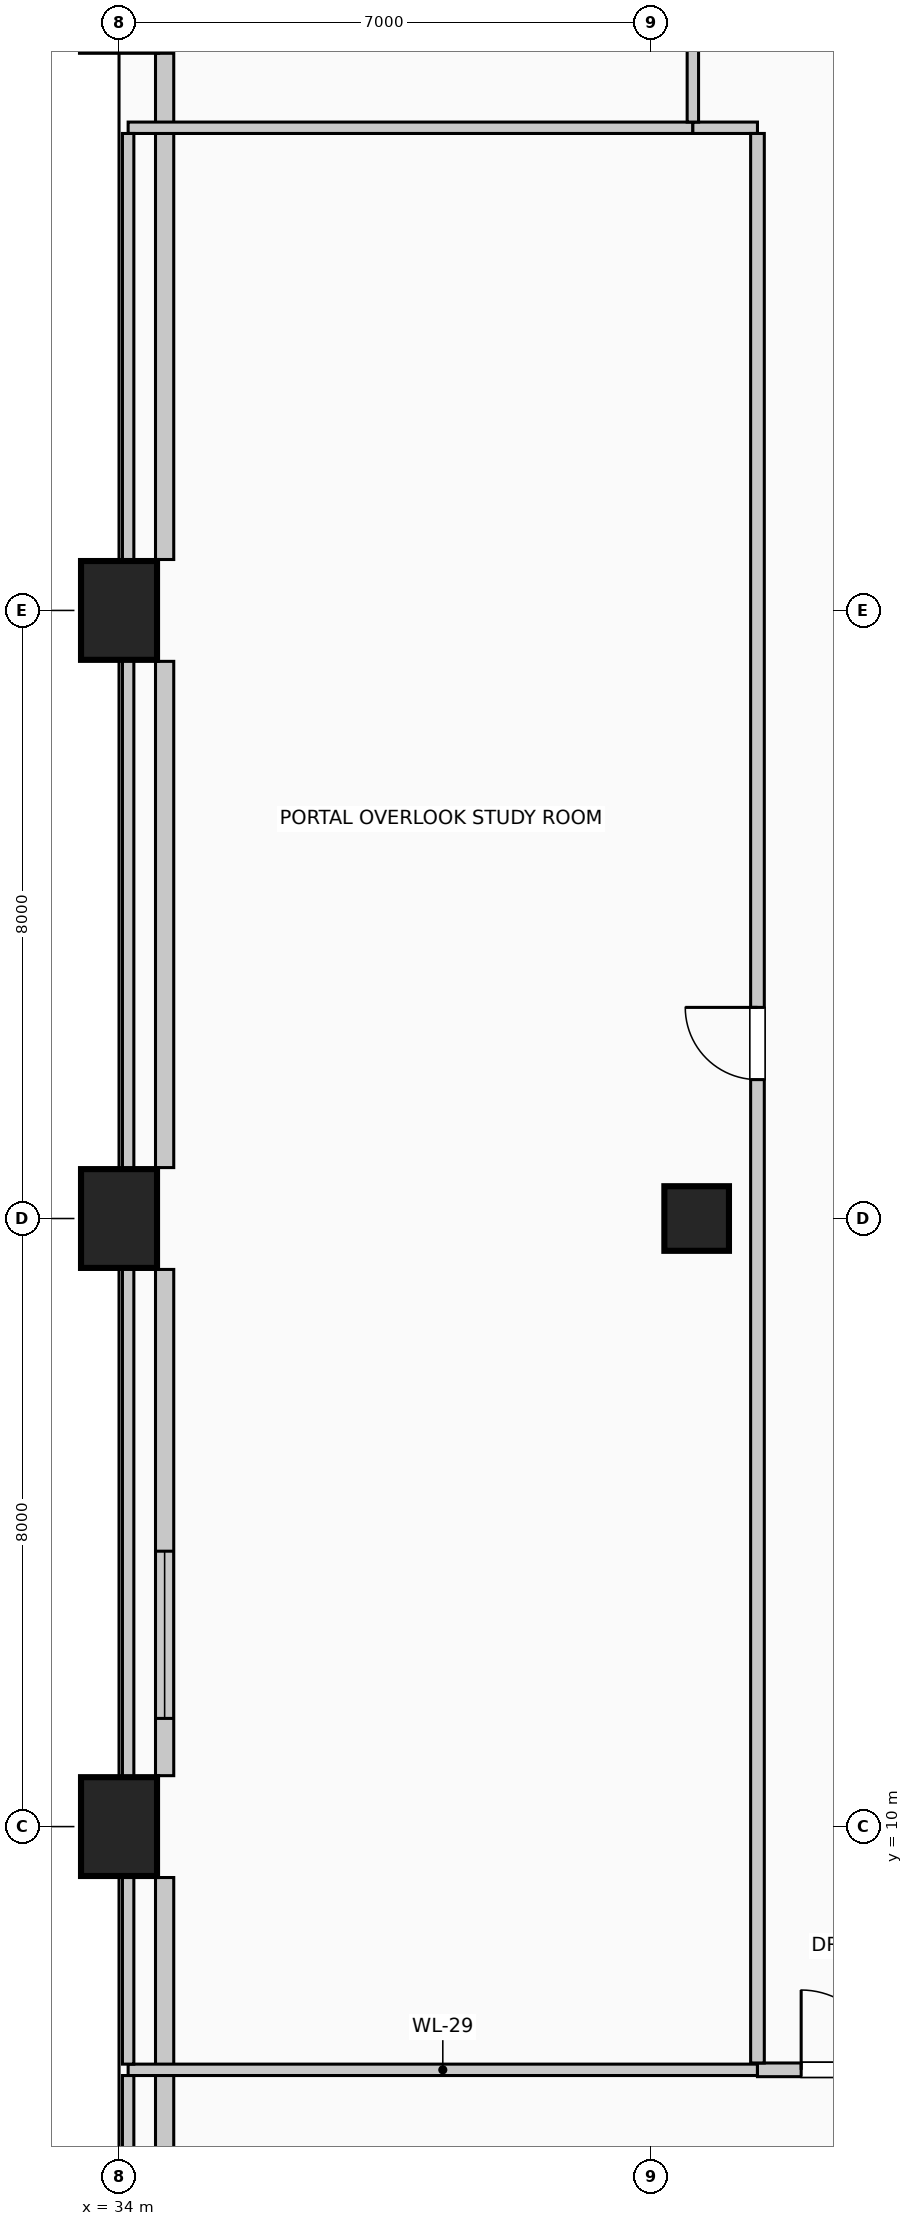
"""IFC4 building model, lengths in metres.
Left out: names, types, materials, properties, quantities, classifications, styles, units other than length and angle.
Written with IfcOpenShell. Run it as: python <this file> out.ifc"""

import sys

from ifc_helpers import new_model, si_unit, direction, frame, frame_2d, origin, origin_2d, place, context, subcontext, project, spatial, rectangle, circle, extrude, element, fill, save


model = new_model("IFC4")
c1 = context("Model", 3, precision=1e-05, world=origin(), true_north=direction((0.0, 1.0)))
c2 = subcontext(c1, "Body", "Model", "MODEL_VIEW")
j1 = project(units=[si_unit("LENGTHUNIT", "METRE"), si_unit("PLANEANGLEUNIT", "RADIAN")], contexts=[c1])
p1 = place(None, origin())
s1 = spatial("IfcSite", under=j1, at=p1, CompositionType="ELEMENT")
p2 = place(p1, origin())
s2 = spatial("IfcBuilding", under=s1, at=p2, CompositionType="ELEMENT")
p3 = place(p2, frame((0.0, 0.0, 186.6)))
s3 = spatial("IfcBuildingStorey", under=s2, at=p3, CompositionType="ELEMENT", Elevation=186.6)
for number, where, z_axis, x_axis in (
    (1, (34.0, 10.0, 0.0), (0.0, 0.0, 1.0), (1.0, 0.0, 0.0)),
    (2, (34.0, 18.0, 0.0), (0.0, 0.0, 1.0), (1.0, 0.0, 0.0)),
    (3, (34.0, 26.0, 0.0), (0.0, 0.0, 1.0), (1.0, 0.0, 0.0)),
    (4, (34.0, 34.0, 0.0), (0.0, 0.0, 1.0), (1.0, 0.0, 0.0)),
):
    element("IfcColumn", number, at=place(p3, frame(where, z_axis=z_axis, x_axis=x_axis)), inside=s3, PredefinedType="COLUMN", context=c2, shape_type="SweptSolid", body=[
        extrude(rectangle(XDim=1.0, YDim=1.3, at=origin_2d()), origin(), (0.0, 0.0, 1.0), 4.0),
    ])
p4 = place(p3, frame((41.6, 18.0, 0.0), z_axis=(0.0, 0.0, 1.0), x_axis=(1.0, 0.0, 0.0)))
e5 = element("IfcColumn", 5, at=p4, inside=s3, PredefinedType="COLUMN", context=c2, shape_type="SweptSolid", body=[
    extrude(circle(Radius=0.425, at=origin_2d()), origin(), (0.0, 0.0, 1.0), 4.0),
])
p5 = place(p3, frame((34.6, 1.27, 0.0), z_axis=(0.0, 0.0, 1.0), x_axis=(0.0, 1.0, 0.0)))
e6 = element("IfcWall", 6, at=p5, inside=s3, PredefinedType="SOLIDWALL", context=c2, shape_type="SweptSolid", body=[
    extrude(rectangle(XDim=8.06, YDim=0.24, at=frame_2d((4.03, 0.0))), origin(), (0.0, 0.0, 1.0), 3.75),
])
p6 = place(p5, frame((1.22, 0.0, 0.42)))
e7 = element("IfcOpeningElement", 7, at=p6, cuts=e6, PredefinedType="OPENING", context=c2, shape_type="SweptSolid", body=[
    extrude(rectangle(XDim=2.2, YDim=1.95, at=frame_2d((1.1, 0.975))), frame((0.0, 0.13, 0.0), z_axis=(0.0, -1.0, 0.0), x_axis=(1.0, 0.0, 0.0)), (0.0, 0.0, 1.0), 0.26),
])
p7 = place(p3, frame((34.6, 10.67, 0.0), z_axis=(0.0, 0.0, 1.0), x_axis=(0.0, 1.0, 0.0)))
e8 = element("IfcWall", 8, at=p7, inside=s3, PredefinedType="SOLIDWALL", context=c2, shape_type="SweptSolid", body=[
    extrude(rectangle(XDim=6.66, YDim=0.24, at=frame_2d((3.33, 0.0))), origin(), (0.0, 0.0, 1.0), 3.75),
])
p8 = place(p7, frame((0.753, 0.0, 0.42)))
e9 = element("IfcOpeningElement", 9, at=p8, cuts=e8, PredefinedType="OPENING", context=c2, shape_type="SweptSolid", body=[
    extrude(rectangle(XDim=2.2, YDim=1.95, at=frame_2d((1.1, 0.975))), frame((0.0, 0.13, 0.0), z_axis=(0.0, -1.0, 0.0), x_axis=(1.0, 0.0, 0.0)), (0.0, 0.0, 1.0), 0.26),
])
for number, where, z_axis, x_axis in (
    (10, (34.6, 18.67, 0.0), (0.0, 0.0, 1.0), (0.0, 1.0, 0.0)),
    (11, (34.6, 26.67, 0.0), (0.0, 0.0, 1.0), (0.0, 1.0, 0.0)),
):
    element("IfcWall", number, at=place(p3, frame(where, z_axis=z_axis, x_axis=x_axis)), inside=s3, PredefinedType="SOLIDWALL", context=c2, shape_type="SweptSolid", body=[
        extrude(rectangle(XDim=6.66, YDim=0.24, at=frame_2d((3.33, 0.0))), origin(), (0.0, 0.0, 1.0), 3.75),
    ])
p9 = place(p3, frame((34.12, 6.8, 0.0), z_axis=(0.0, 0.0, 1.0), x_axis=(1.0, 0.0, 0.0)))
e12 = element("IfcWall", 12, at=p9, inside=s3, PredefinedType="PARTITIONING", context=c2, shape_type="SweptSolid", body=[
    extrude(rectangle(XDim=8.28, YDim=0.15, at=frame_2d((4.14, 0.0))), origin(), (0.0, 0.0, 1.0), 3.245),
])
p10 = place(p3, frame((42.4, 6.8, 0.0), z_axis=(0.0, 0.0, 1.0), x_axis=(1.0, 0.0, 0.0)))
e13 = element("IfcWall", 13, at=p10, inside=s3, PredefinedType="PARTITIONING", context=c2, shape_type="SweptSolid", body=[
    extrude(rectangle(XDim=2.2, YDim=0.18, at=frame_2d((1.1, 0.0))), origin(), (0.0, 0.0, 1.0), 3.245),
])
p11 = place(p10, frame((0.575, 0.0, 0.0)))
e14 = element("IfcOpeningElement", 14, at=p11, cuts=e13, PredefinedType="OPENING", context=c2, shape_type="SweptSolid", body=[
    extrude(rectangle(XDim=1.05, YDim=2.15, at=frame_2d((0.525, 1.075))), frame((0.0, 0.1, 0.0), z_axis=(0.0, -1.0, 0.0), x_axis=(1.0, 0.0, 0.0)), (0.0, 0.0, 1.0), 0.2),
])
p12 = place(p3, frame((34.12, 32.35, 0.0), z_axis=(0.0, 0.0, 1.0), x_axis=(1.0, 0.0, 0.0)))
e15 = element("IfcWall", 15, at=p12, inside=s3, PredefinedType="PARTITIONING", context=c2, shape_type="SweptSolid", body=[
    extrude(rectangle(XDim=7.43, YDim=0.15, at=frame_2d((3.715, 0.0))), origin(), (0.0, 0.0, 1.0), 3.75),
])
p13 = place(p3, frame((41.55, 32.35, 0.0), z_axis=(0.0, 0.0, 1.0), x_axis=(1.0, 0.0, 0.0)))
e16 = element("IfcWall", 16, at=p13, inside=s3, PredefinedType="PARTITIONING", context=c2, shape_type="SweptSolid", body=[
    extrude(rectangle(XDim=0.85, YDim=0.15, at=frame_2d((0.425, 0.0))), origin(), (0.0, 0.0, 1.0), 3.75),
])
p14 = place(p3, frame((34.12, 1.25, 0.0), z_axis=(0.0, 0.0, 1.0), x_axis=(0.0, 1.0, 0.0)))
e17 = element("IfcWall", 17, at=p14, inside=s3, PredefinedType="PARTITIONING", context=c2, shape_type="SweptSolid", body=[
    extrude(rectangle(XDim=5.475, YDim=0.15, at=frame_2d((2.738, 0.0))), origin(), (0.0, 0.0, 1.0), 3.145),
])
p15 = place(p3, frame((34.12, 6.875, 0.0), z_axis=(0.0, 0.0, 1.0), x_axis=(0.0, 1.0, 0.0)))
e18 = element("IfcWall", 18, at=p15, inside=s3, PredefinedType="PARTITIONING", context=c2, shape_type="SweptSolid", body=[
    extrude(rectangle(XDim=2.475, YDim=0.15, at=frame_2d((1.238, 0.0))), origin(), (0.0, 0.0, 1.0), 3.145),
])
for number, where, z_axis, x_axis in (
    (19, (34.12, 10.65, 0.0), (0.0, 0.0, 1.0), (0.0, 1.0, 0.0)),
    (20, (34.12, 18.65, 0.0), (0.0, 0.0, 1.0), (0.0, 1.0, 0.0)),
):
    element("IfcWall", number, at=place(p3, frame(where, z_axis=z_axis, x_axis=x_axis)), inside=s3, PredefinedType="PARTITIONING", context=c2, shape_type="SweptSolid", body=[
        extrude(rectangle(XDim=6.7, YDim=0.15, at=frame_2d((3.35, 0.0))), origin(), (0.0, 0.0, 1.0), 3.145),
    ])
p16 = place(p3, frame((34.12, 26.65, 0.0), z_axis=(0.0, 0.0, 1.0), x_axis=(0.0, 1.0, 0.0)))
e21 = element("IfcWall", 21, at=p16, inside=s3, PredefinedType="PARTITIONING", context=c2, shape_type="SweptSolid", body=[
    extrude(rectangle(XDim=5.625, YDim=0.15, at=frame_2d((2.812, 0.0))), origin(), (0.0, 0.0, 1.0), 3.145),
])
p17 = place(p3, frame((41.55, 32.425, 0.0), z_axis=(0.0, 0.0, 1.0), x_axis=(0.0, 1.0, 0.0)))
e22 = element("IfcWall", 22, at=p17, inside=s3, PredefinedType="PARTITIONING", context=c2, shape_type="SweptSolid", body=[
    extrude(rectangle(XDim=1.15, YDim=0.15, at=frame_2d((0.575, 0.0))), origin(), (0.0, 0.0, 1.0), 3.145),
])
p18 = place(p3, frame((42.4, 6.89, 0.0), z_axis=(0.0, 0.0, 1.0), x_axis=(0.0, 1.0, 0.0)))
e23 = element("IfcWall", 23, at=p18, inside=s3, PredefinedType="PARTITIONING", context=c2, shape_type="SweptSolid", body=[
    extrude(rectangle(XDim=25.385, YDim=0.18, at=frame_2d((12.692, 0.0))), origin(), (0.0, 0.0, 1.0), 3.75),
])
p19 = place(p18, frame((12.938, 0.0, 0.0)))
e24 = element("IfcOpeningElement", 24, at=p19, cuts=e23, PredefinedType="OPENING", context=c2, shape_type="SweptSolid", body=[
    extrude(rectangle(XDim=0.95, YDim=2.15, at=frame_2d((0.475, 1.075))), frame((0.0, 0.1, 0.0), z_axis=(0.0, -1.0, 0.0), x_axis=(1.0, 0.0, 0.0)), (0.0, 0.0, 1.0), 0.2),
])
p20 = place(p8, origin())
e25 = element("IfcWindow", 25, at=p20, inside=s3, PartitioningType="SINGLE_PANEL", PredefinedType="WINDOW", context=c2, shape_type="SweptSolid", body=[
    extrude(rectangle(XDim=2.2, YDim=1.95, at=frame_2d((1.1, 0.975))), frame((0.0, 0.03, 0.0), z_axis=(0.0, -1.0, 0.0), x_axis=(1.0, 0.0, 0.0)), (0.0, 0.0, 1.0), 0.06),
])
fill(e9, e25)
p21 = place(p11, origin())
e26 = element("IfcDoor", 26, at=p21, inside=s3, OperationType="SINGLE_SWING_LEFT", PredefinedType="DOOR", context=c2, shape_type="SweptSolid", body=[
    extrude(rectangle(XDim=1.05, YDim=2.15, at=frame_2d((0.525, 1.075))), frame((0.0, 0.025, 0.0), z_axis=(0.0, -1.0, 0.0), x_axis=(1.0, 0.0, 0.0)), (0.0, 0.0, 1.0), 0.05),
])
fill(e14, e26)
p22 = place(p19, origin())
e27 = element("IfcDoor", 27, at=p22, inside=s3, OperationType="SINGLE_SWING_RIGHT", PredefinedType="DOOR", context=c2, shape_type="SweptSolid", body=[
    extrude(rectangle(XDim=0.95, YDim=2.15, at=frame_2d((0.475, 1.075))), frame((0.0, 0.025, 0.0), z_axis=(0.0, -1.0, 0.0), x_axis=(1.0, 0.0, 0.0)), (0.0, 0.0, 1.0), 0.05),
])
fill(e24, e27)
save(model, sys.argv[1])
